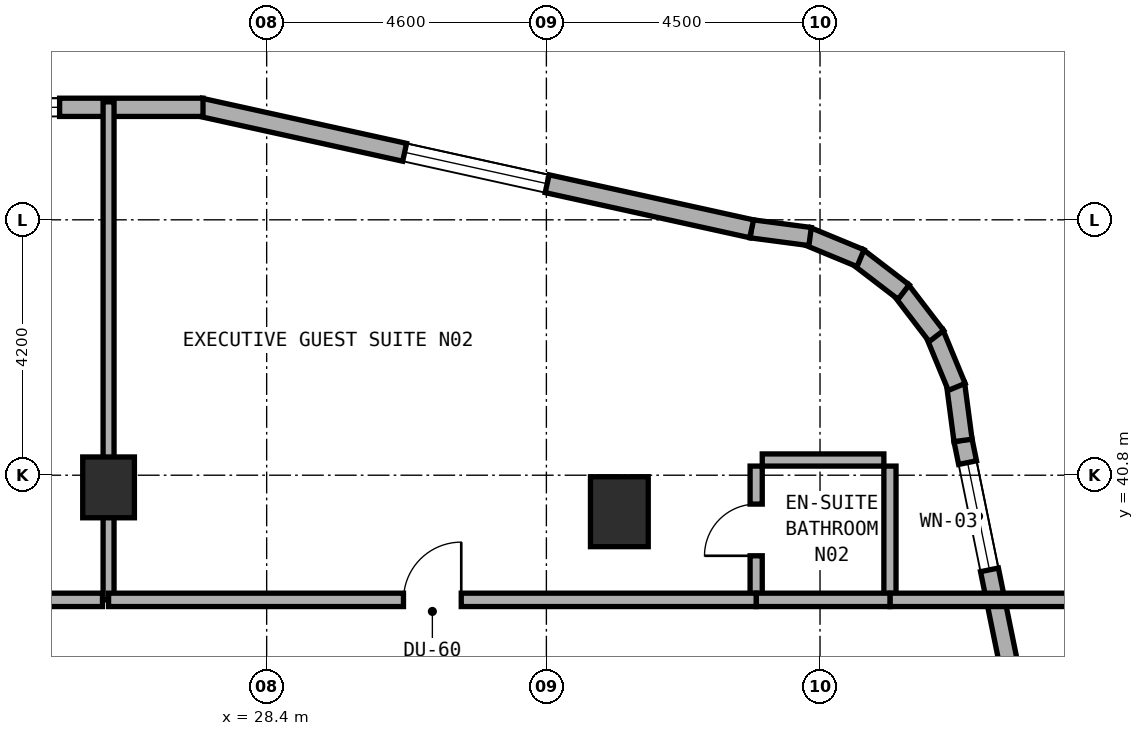
"""IFC4 building model, lengths in metres.
Left out: names, types, materials, properties, quantities, classifications, styles, units other than length and angle.
Written with IfcOpenShell. Run it as: python <this file> out.ifc"""

import sys

from ifc_helpers import new_model, si_unit, direction, frame, frame_2d, origin, origin_2d, place, context, subcontext, project, spatial, rectangle, extrude, element, fill, save


model = new_model("IFC4")
c1 = context("Model", 3, precision=1e-05, world=origin(), true_north=direction((0.0, 1.0)))
c2 = subcontext(c1, "Body", "Model", "MODEL_VIEW")
j1 = project(units=[si_unit("LENGTHUNIT", "METRE"), si_unit("PLANEANGLEUNIT", "RADIAN")], contexts=[c1])
p1 = place(None, origin())
s1 = spatial("IfcSite", under=j1, at=p1, CompositionType="ELEMENT")
p2 = place(p1, origin())
s2 = spatial("IfcBuilding", under=s1, at=p2, CompositionType="ELEMENT")
p3 = place(p2, frame((0.0, 0.0, 80.0)))
s3 = spatial("IfcBuildingStorey", under=s2, at=p3, CompositionType="ELEMENT", Elevation=80.0)
p4 = place(p3, frame((25.8, 40.6, 0.0), z_axis=(0.0, 0.0, 1.0), x_axis=(1.0, 0.0, 0.0)))
e1 = element("IfcColumn", 1, at=p4, inside=s3, PredefinedType="COLUMN", context=c2, shape_type="SweptSolid", body=[
    extrude(rectangle(XDim=0.85, YDim=1.0, at=origin_2d()), origin(), (0.0, 0.0, 1.0), 3.5),
])
p5 = place(p3, frame((34.2, 40.2, 0.0), z_axis=(0.0, 0.0, 1.0), x_axis=(1.0, 0.0, 0.0)))
e2 = element("IfcColumn", 2, at=p5, inside=s3, PredefinedType="COLUMN", context=c2, shape_type="SweptSolid", body=[
    extrude(rectangle(XDim=0.95, YDim=1.15, at=origin_2d()), origin(), (0.0, 0.0, 1.0), 3.5),
])
p6 = place(p3, frame((41.864, 31.516, 0.0), z_axis=(0.0, 0.0, 1.0), x_axis=(-0.199990901713, 0.979797754249, 0.0)))
e3 = element("IfcWall", 3, at=p6, inside=s3, PredefinedType="STANDARD", context=c2, shape_type="SweptSolid", body=[
    extrude(rectangle(XDim=10.065, YDim=0.3, at=frame_2d((5.033, 0.0))), origin(), (0.0, 0.0, 1.0), 3.22),
])
p7 = place(p6, frame((2.429, 0.0, 0.8)))
e4 = element("IfcOpeningElement", 4, at=p7, cuts=e3, PredefinedType="OPENING", context=c2, shape_type="SweptSolid", body=[
    extrude(rectangle(XDim=2.4, YDim=1.6, at=frame_2d((1.2, 0.8))), frame((0.0, 0.16, 0.0), z_axis=(0.0, -1.0, 0.0), x_axis=(1.0, 0.0, 0.0)), (0.0, 0.0, 1.0), 0.32),
])
p8 = place(p6, frame((7.887, 0.0, 0.85)))
e5 = element("IfcOpeningElement", 5, at=p8, cuts=e3, PredefinedType="OPENING", context=c2, shape_type="SweptSolid", body=[
    extrude(rectangle(XDim=1.8, YDim=1.5, at=frame_2d((0.9, 0.75))), frame((0.0, 0.16, 0.0), z_axis=(0.0, -1.0, 0.0), x_axis=(1.0, 0.0, 0.0)), (0.0, 0.0, 1.0), 0.32),
])
p9 = place(p3, frame((39.852, 41.372, 0.0), z_axis=(0.0, 0.0, 1.0), x_axis=(-0.131174864804, 0.991359246108, 0.0)))
e6 = element("IfcWall", 6, at=p9, inside=s3, PredefinedType="STANDARD", context=c2, shape_type="SweptSolid", body=[
    extrude(rectangle(XDim=0.938, YDim=0.3, at=frame_2d((0.469, 0.0))), origin(), (0.0, 0.0, 1.0), 3.22),
])
p10 = place(p3, frame((39.748, 42.252, 0.0), z_axis=(0.0, 0.0, 1.0), x_axis=(-0.382344263057, 0.924019948111, 0.0)))
e7 = element("IfcWall", 7, at=p10, inside=s3, PredefinedType="STANDARD", context=c2, shape_type="SweptSolid", body=[
    extrude(rectangle(XDim=0.955, YDim=0.3, at=frame_2d((0.477, 0.0))), origin(), (0.0, 0.0, 1.0), 3.22),
])
p11 = place(p3, frame((39.414, 43.089, 0.0), z_axis=(0.0, 0.0, 1.0), x_axis=(-0.608474481025, 0.793573440799, 0.0)))
e8 = element("IfcWall", 8, at=p11, inside=s3, PredefinedType="STANDARD", context=c2, shape_type="SweptSolid", body=[
    extrude(rectangle(XDim=0.955, YDim=0.3, at=frame_2d((0.478, 0.0))), origin(), (0.0, 0.0, 1.0), 3.22),
])
p12 = place(p3, frame((38.875, 43.812, 0.0), z_axis=(0.0, 0.0, 1.0), x_axis=(-0.793668068435, 0.608351047625, 0.0)))
e9 = element("IfcWall", 9, at=p12, inside=s3, PredefinedType="STANDARD", context=c2, shape_type="SweptSolid", body=[
    extrude(rectangle(XDim=0.955, YDim=0.3, at=frame_2d((0.478, 0.0))), origin(), (0.0, 0.0, 1.0), 3.22),
])
p13 = place(p3, frame((38.166, 44.369, 0.0), z_axis=(0.0, 0.0, 1.0), x_axis=(-0.924019948111, 0.382344263057, 0.0)))
e10 = element("IfcWall", 10, at=p13, inside=s3, PredefinedType="STANDARD", context=c2, shape_type="SweptSolid", body=[
    extrude(rectangle(XDim=0.955, YDim=0.3, at=frame_2d((0.477, 0.0))), origin(), (0.0, 0.0, 1.0), 3.22),
])
p14 = place(p3, frame((37.337, 44.725, 0.0), z_axis=(0.0, 0.0, 1.0), x_axis=(-0.991454295543, 0.130454512571, 0.0)))
e11 = element("IfcWall", 11, at=p14, inside=s3, PredefinedType="STANDARD", context=c2, shape_type="SweptSolid", body=[
    extrude(rectangle(XDim=0.973, YDim=0.3, at=frame_2d((0.487, 0.0))), origin(), (0.0, 0.0, 1.0), 3.22),
])
p15 = place(p3, frame((36.376, 44.852, 0.0), z_axis=(0.0, 0.0, 1.0), x_axis=(-0.976540764801, 0.215332614068, 0.0)))
e12 = element("IfcWall", 12, at=p15, inside=s3, PredefinedType="STANDARD", context=c2, shape_type="SweptSolid", body=[
    extrude(rectangle(XDim=9.288, YDim=0.3, at=frame_2d((4.644, 0.0))), origin(), (0.0, 0.0, 1.0), 3.22),
])
p16 = place(p15, frame((3.444, 0.0, 0.8)))
e13 = element("IfcOpeningElement", 13, at=p16, cuts=e12, PredefinedType="OPENING", context=c2, shape_type="SweptSolid", body=[
    extrude(rectangle(XDim=2.4, YDim=1.6, at=frame_2d((1.2, 0.8))), frame((0.0, 0.16, 0.0), z_axis=(0.0, -1.0, 0.0), x_axis=(1.0, 0.0, 0.0)), (0.0, 0.0, 1.0), 0.32),
])
p17 = place(p3, frame((27.353, 46.85, 0.0), z_axis=(0.0, 0.0, 1.0), x_axis=(-1.0, 0.0, 0.0)))
e14 = element("IfcWall", 14, at=p17, inside=s3, PredefinedType="STANDARD", context=c2, shape_type="SweptSolid", body=[
    extrude(rectangle(XDim=12.591, YDim=0.3, at=frame_2d((6.295, 0.0))), origin(), (0.0, 0.0, 1.0), 3.22),
])
p18 = place(p17, frame((5.713, 0.0, 0.0)))
e15 = element("IfcOpeningElement", 15, at=p18, cuts=e14, PredefinedType="OPENING", context=c2, shape_type="SweptSolid", body=[
    extrude(rectangle(XDim=1.2, YDim=2.15, at=frame_2d((0.6, 1.075))), frame((0.0, 0.16, 0.0), z_axis=(0.0, -1.0, 0.0), x_axis=(1.0, 0.0, 0.0)), (0.0, 0.0, 1.0), 0.32),
])
p19 = place(p17, frame((2.358, 0.0, 0.8)))
e16 = element("IfcOpeningElement", 16, at=p19, cuts=e14, PredefinedType="OPENING", context=c2, shape_type="SweptSolid", body=[
    extrude(rectangle(XDim=2.4, YDim=1.6, at=frame_2d((1.2, 0.8))), frame((0.0, 0.16, 0.0), z_axis=(0.0, -1.0, 0.0), x_axis=(1.0, 0.0, 0.0)), (0.0, 0.0, 1.0), 0.32),
])
p20 = place(p17, frame((8.657, 0.0, 0.8)))
e17 = element("IfcOpeningElement", 17, at=p20, cuts=e14, PredefinedType="OPENING", context=c2, shape_type="SweptSolid", body=[
    extrude(rectangle(XDim=2.4, YDim=1.6, at=frame_2d((1.2, 0.8))), frame((0.0, 0.16, 0.0), z_axis=(0.0, -1.0, 0.0), x_axis=(1.0, 0.0, 0.0)), (0.0, 0.0, 1.0), 0.32),
])
p21 = place(p3, frame((11.7, 38.75, 0.0), z_axis=(0.0, 0.0, 1.0), x_axis=(1.0, 0.0, 0.0)))
e18 = element("IfcWall", 18, at=p21, inside=s3, PredefinedType="SOLIDWALL", context=c2, shape_type="SweptSolid", body=[
    extrude(rectangle(XDim=14.0, YDim=0.22, at=frame_2d((7.0, 0.0))), origin(), (0.0, 0.0, 1.0), 2.495),
])
p22 = place(p21, frame((5.863, 0.0, 0.0)))
e19 = element("IfcOpeningElement", 19, at=p22, cuts=e18, PredefinedType="OPENING", context=c2, shape_type="SweptSolid", body=[
    extrude(rectangle(XDim=0.95, YDim=2.1, at=frame_2d((0.475, 1.05))), frame((0.0, 0.12, 0.0), z_axis=(0.0, -1.0, 0.0), x_axis=(1.0, 0.0, 0.0)), (0.0, 0.0, 1.0), 0.24),
])
p23 = place(p3, frame((25.8, 38.75, 0.0), z_axis=(0.0, 0.0, 1.0), x_axis=(0.0, 1.0, 0.0)))
e20 = element("IfcWall", 20, at=p23, inside=s3, PredefinedType="SOLIDWALL", context=c2, shape_type="SweptSolid", body=[
    extrude(rectangle(XDim=8.19, YDim=0.18, at=frame_2d((4.095, 0.0))), origin(), (0.0, 0.0, 1.0), 2.495),
])
p24 = place(p3, frame((36.45, 38.85, 0.0), z_axis=(0.0, 0.0, 1.0), x_axis=(0.0, 1.0, 0.0)))
e21 = element("IfcWall", 21, at=p24, inside=s3, PredefinedType="PLUMBINGWALL", context=c2, shape_type="SweptSolid", body=[
    extrude(rectangle(XDim=2.1, YDim=0.2, at=frame_2d((1.05, 0.0))), origin(), (0.0, 0.0, 1.0), 3.22),
])
p25 = place(p24, frame((0.625, 0.0, 0.0)))
e22 = element("IfcOpeningElement", 22, at=p25, cuts=e21, PredefinedType="OPENING", context=c2, shape_type="SweptSolid", body=[
    extrude(rectangle(XDim=0.85, YDim=2.1, at=frame_2d((0.425, 1.05))), frame((0.0, 0.11, 0.0), z_axis=(0.0, -1.0, 0.0), x_axis=(1.0, 0.0, 0.0)), (0.0, 0.0, 1.0), 0.22),
])
p26 = place(p3, frame((36.55, 41.05, 0.0), z_axis=(0.0, 0.0, 1.0), x_axis=(1.0, 0.0, 0.0)))
e23 = element("IfcWall", 23, at=p26, inside=s3, PredefinedType="PLUMBINGWALL", context=c2, shape_type="SweptSolid", body=[
    extrude(rectangle(XDim=2.0, YDim=0.2, at=frame_2d((1.0, 0.0))), origin(), (0.0, 0.0, 1.0), 3.22),
])
p27 = place(p3, frame((38.65, 38.85, 0.0), z_axis=(0.0, 0.0, 1.0), x_axis=(0.0, 1.0, 0.0)))
e24 = element("IfcWall", 24, at=p27, inside=s3, PredefinedType="PLUMBINGWALL", context=c2, shape_type="SweptSolid", body=[
    extrude(rectangle(XDim=2.1, YDim=0.2, at=frame_2d((1.05, 0.0))), origin(), (0.0, 0.0, 1.0), 3.22),
])
p28 = place(p3, frame((38.65, 38.75, 0.0), z_axis=(0.0, 0.0, 1.0), x_axis=(1.0, 0.0, 0.0)))
e25 = element("IfcWall", 25, at=p28, inside=s3, PredefinedType="SOLIDWALL", context=c2, shape_type="SweptSolid", body=[
    extrude(rectangle(XDim=3.19, YDim=0.22, at=frame_2d((1.595, 0.0))), origin(), (0.0, 0.0, 1.0), 3.22),
])
p29 = place(p3, frame((36.45, 38.75, 0.0), z_axis=(0.0, 0.0, 1.0), x_axis=(1.0, 0.0, 0.0)))
e26 = element("IfcWall", 26, at=p29, inside=s3, PredefinedType="SOLIDWALL", context=c2, shape_type="SweptSolid", body=[
    extrude(rectangle(XDim=2.2, YDim=0.22, at=frame_2d((1.1, 0.0))), origin(), (0.0, 0.0, 1.0), 3.22),
])
p30 = place(p3, frame((25.8, 38.75, 0.0), z_axis=(0.0, 0.0, 1.0), x_axis=(1.0, 0.0, 0.0)))
e27 = element("IfcWall", 27, at=p30, inside=s3, PredefinedType="SOLIDWALL", context=c2, shape_type="SweptSolid", body=[
    extrude(rectangle(XDim=10.65, YDim=0.22, at=frame_2d((5.325, 0.0))), origin(), (0.0, 0.0, 1.0), 2.495),
])
p31 = place(p30, frame((4.85, 0.0, 0.0)))
e28 = element("IfcOpeningElement", 28, at=p31, cuts=e27, PredefinedType="OPENING", context=c2, shape_type="SweptSolid", body=[
    extrude(rectangle(XDim=0.95, YDim=2.1, at=frame_2d((0.475, 1.05))), frame((0.0, 0.12, 0.0), z_axis=(0.0, -1.0, 0.0), x_axis=(1.0, 0.0, 0.0)), (0.0, 0.0, 1.0), 0.24),
])
p32 = place(p8, origin())
e29 = element("IfcWindow", 29, at=p32, inside=s3, PartitioningType="SINGLE_PANEL", PredefinedType="WINDOW", context=c2, shape_type="SweptSolid", body=[
    extrude(rectangle(XDim=1.8, YDim=1.5, at=frame_2d((0.9, 0.75))), frame((0.0, 0.03, 0.0), z_axis=(0.0, -1.0, 0.0), x_axis=(1.0, 0.0, 0.0)), (0.0, 0.0, 1.0), 0.06),
])
fill(e5, e29)
p33 = place(p16, origin())
e30 = element("IfcWindow", 30, at=p33, inside=s3, PartitioningType="SINGLE_PANEL", PredefinedType="WINDOW", context=c2, shape_type="SweptSolid", body=[
    extrude(rectangle(XDim=2.4, YDim=1.6, at=frame_2d((1.2, 0.8))), frame((0.0, 0.03, 0.0), z_axis=(0.0, -1.0, 0.0), x_axis=(1.0, 0.0, 0.0)), (0.0, 0.0, 1.0), 0.06),
])
fill(e13, e30)
p34 = place(p19, origin())
e31 = element("IfcWindow", 31, at=p34, inside=s3, PartitioningType="SINGLE_PANEL", PredefinedType="WINDOW", context=c2, shape_type="SweptSolid", body=[
    extrude(rectangle(XDim=2.4, YDim=1.6, at=frame_2d((1.2, 0.8))), frame((0.0, 0.03, 0.0), z_axis=(0.0, -1.0, 0.0), x_axis=(1.0, 0.0, 0.0)), (0.0, 0.0, 1.0), 0.06),
])
fill(e16, e31)
p35 = place(p25, origin())
e32 = element("IfcDoor", 32, at=p35, inside=s3, OperationType="SINGLE_SWING_LEFT", PredefinedType="DOOR", context=c2, shape_type="SweptSolid", body=[
    extrude(rectangle(XDim=0.85, YDim=2.1, at=frame_2d((0.425, 1.05))), frame((0.0, 0.025, 0.0), z_axis=(0.0, -1.0, 0.0), x_axis=(1.0, 0.0, 0.0)), (0.0, 0.0, 1.0), 0.05),
])
fill(e22, e32)
p36 = place(p31, origin())
e33 = element("IfcDoor", 33, at=p36, inside=s3, OperationType="SINGLE_SWING_RIGHT", PredefinedType="DOOR", context=c2, shape_type="SweptSolid", body=[
    extrude(rectangle(XDim=0.95, YDim=2.1, at=frame_2d((0.475, 1.05))), frame((0.0, 0.025, 0.0), z_axis=(0.0, -1.0, 0.0), x_axis=(1.0, 0.0, 0.0)), (0.0, 0.0, 1.0), 0.05),
])
fill(e28, e33)
save(model, sys.argv[1])
